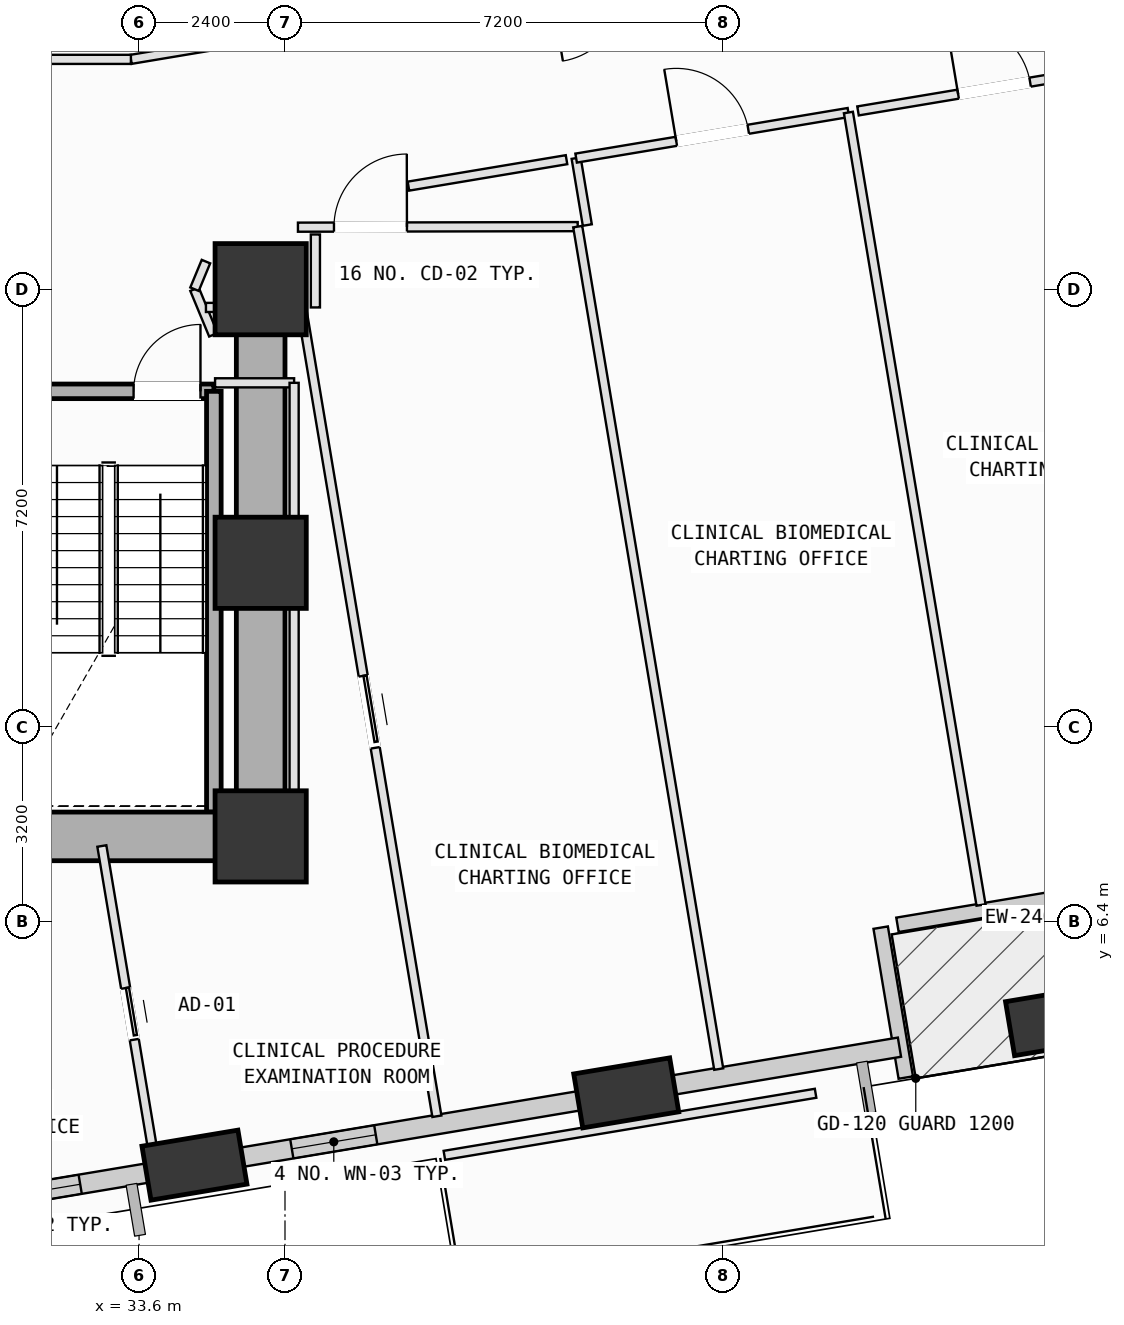
"""IFC4 building model, lengths in metres.
Left out: names, types, materials, properties, quantities, classifications, styles, units other than length and angle.
Written with IfcOpenShell. Run it as: python <this file> out.ifc"""

import sys

from ifc_helpers import new_model, si_unit, direction, frame, frame_2d, origin, origin_2d, place, context, subcontext, project, spatial, rectangle, extrude, element, fill, save


model = new_model("IFC4")
c1 = context("Model", 3, precision=1e-05, world=origin(), true_north=direction((0.0, 1.0)))
c2 = subcontext(c1, "Body", "Model", "MODEL_VIEW")
j1 = project(units=[si_unit("LENGTHUNIT", "METRE"), si_unit("PLANEANGLEUNIT", "RADIAN")], contexts=[c1])
p1 = place(None, origin())
s1 = spatial("IfcSite", under=j1, at=p1, CompositionType="ELEMENT")
p2 = place(p1, origin())
s2 = spatial("IfcBuilding", under=s1, at=p2, CompositionType="ELEMENT")
p3 = place(p2, frame((0.0, 0.0, 63.0)))
s3 = spatial("IfcBuildingStorey", under=s2, at=p3, CompositionType="ELEMENT", Elevation=63.0)
for number, where, z_axis, x_axis in (
    (1, (35.6, 7.8, 0.0), (0.0, 0.0, 1.0), (1.0, 0.0, 0.0)),
    (2, (35.6, 12.3, 0.0), (0.0, 0.0, 1.0), (1.0, 0.0, 0.0)),
    (3, (35.6, 16.8, 0.0), (0.0, 0.0, 1.0), (1.0, 0.0, 0.0)),
):
    element("IfcColumn", number, at=place(p3, frame(where, z_axis=z_axis, x_axis=x_axis)), inside=s3, PredefinedType="COLUMN", context=c2, shape_type="SweptSolid", body=[
        extrude(rectangle(XDim=1.5, YDim=1.5, at=origin_2d()), origin(), (0.0, 0.0, 1.0), 4.0),
    ])
p4 = place(p3, frame((34.511, 2.393, 0.002), z_axis=(0.092393835474, 0.004501082176, 0.995712367818), x_axis=(-0.212136509063, 0.977120773498, 0.015267466098)))
e4 = element("IfcColumn", 4, at=p4, inside=s3, PredefinedType="COLUMN", context=c2, shape_type="SweptSolid", body=[
    extrude(rectangle(XDim=1.6, YDim=0.9, at=origin_2d()), origin(), (0.0, 0.0, 1.0), 4.014),
])
p5 = place(p3, frame((41.612, 3.581, 0.002), z_axis=(0.087275535166, 0.033815468677, 0.995610111961), x_axis=(-0.509554828629, 0.860299502631, 0.015448054711)))
e5 = element("IfcColumn", 5, at=p5, inside=s3, PredefinedType="COLUMN", context=c2, shape_type="SweptSolid", body=[
    extrude(rectangle(XDim=1.6, YDim=0.9, at=origin_2d()), origin(), (0.0, 0.0, 1.0), 4.014),
])
p6 = place(p3, frame((48.713, 4.77, 0.002), z_axis=(0.082085964751, 0.063007509583, 0.994631564011), x_axis=(-0.730759238863, 0.682421599788, 0.01707907958)))
e6 = element("IfcColumn", 6, at=p6, inside=s3, PredefinedType="COLUMN", context=c2, shape_type="SweptSolid", body=[
    extrude(rectangle(XDim=1.6, YDim=0.9, at=origin_2d()), origin(), (0.0, 0.0, 1.0), 4.018),
])
p7 = place(p3, frame((52.938, 7.494, 0.0), z_axis=(0.0, 0.0, 1.0), x_axis=(-0.986280873968, -0.165075854213, 0.0)))
e7 = element("IfcWall", 7, at=p7, inside=s3, PredefinedType="SOLIDWALL", context=c2, shape_type="SweptSolid", body=[
    extrude(rectangle(XDim=6.96, YDim=0.24, at=frame_2d((3.48, 0.0))), origin(), (0.0, 0.0, 1.0), 3.165),
])
p8 = place(p7, frame((2.485, 0.0, 0.0)))
e8 = element("IfcOpeningElement", 8, at=p8, cuts=e7, PredefinedType="OPENING", context=c2, shape_type="SweptSolid", body=[
    extrude(rectangle(XDim=1.1, YDim=2.15, at=frame_2d((0.55, 1.075))), frame((0.0, 0.13, 0.0), z_axis=(0.0, -1.0, 0.0), x_axis=(1.0, 0.0, 0.0)), (0.0, 0.0, 1.0), 0.26),
])
p9 = place(p3, frame((45.797, 6.299, 0.0), z_axis=(0.0, 0.0, 1.0), x_axis=(0.165032373682, -0.986288150409, 0.0)))
e9 = element("IfcWall", 9, at=p9, inside=s3, PredefinedType="SOLIDWALL", context=c2, shape_type="SweptSolid", body=[
    extrude(rectangle(XDim=2.5, YDim=0.24, at=frame_2d((1.25, 0.0))), origin(), (0.0, 0.0, 1.0), 3.165),
])
p10 = place(p3, frame((34.094, 2.323, 0.0), z_axis=(0.0, 0.0, 1.0), x_axis=(-0.986286856303, -0.1650401075, 0.0)))
e10 = element("IfcWall", 10, at=p10, inside=s3, PredefinedType="SOLIDWALL", context=c2, shape_type="SweptSolid", body=[
    extrude(rectangle(XDim=5.99, YDim=0.32, at=frame_2d((2.995, 0.0))), origin(), (0.0, 0.0, 1.0), 3.165),
])
p11 = place(p10, frame((1.482, 0.0, 0.75)))
e11 = element("IfcOpeningElement", 11, at=p11, cuts=e10, PredefinedType="OPENING", context=c2, shape_type="SweptSolid", body=[
    extrude(rectangle(XDim=2.0, YDim=1.95, at=frame_2d((1.0, 0.975))), frame((0.0, 0.17, 0.0), z_axis=(0.0, -1.0, 0.0), x_axis=(1.0, 0.0, 0.0)), (0.0, 0.0, 1.0), 0.34),
])
p12 = place(p3, frame((41.195, 3.512, 0.0), z_axis=(0.0, 0.0, 1.0), x_axis=(-0.986281247381, -0.165073623166, 0.0)))
e12 = element("IfcWall", 12, at=p12, inside=s3, PredefinedType="SOLIDWALL", context=c2, shape_type="SweptSolid", body=[
    extrude(rectangle(XDim=5.985, YDim=0.32, at=frame_2d((2.993, 0.0))), origin(), (0.0, 0.0, 1.0), 3.165),
])
p13 = place(p12, frame((3.754, 0.0, 0.75)))
e13 = element("IfcOpeningElement", 13, at=p13, cuts=e12, PredefinedType="OPENING", context=c2, shape_type="SweptSolid", body=[
    extrude(rectangle(XDim=1.4, YDim=1.85, at=frame_2d((0.7, 0.925))), frame((0.0, 0.17, 0.0), z_axis=(0.0, -1.0, 0.0), x_axis=(1.0, 0.0, 0.0)), (0.0, 0.0, 1.0), 0.34),
])
p14 = place(p3, frame((46.105, 4.333, 0.0), z_axis=(0.0, 0.0, 1.0), x_axis=(-0.986288568415, -0.165029875517, 0.0)))
e14 = element("IfcWall", 14, at=p14, inside=s3, PredefinedType="SOLIDWALL", context=c2, shape_type="SweptSolid", body=[
    extrude(rectangle(XDim=3.765, YDim=0.32, at=frame_2d((1.882, 0.0))), origin(), (0.0, 0.0, 1.0), 3.145),
])
p15 = place(p3, frame((31.37, 15.12, 0.0), z_axis=(0.0, 0.0, 1.0), x_axis=(1.0, 0.0, 0.0)))
e15 = element("IfcWall", 15, at=p15, inside=s3, PredefinedType="SOLIDWALL", context=c2, shape_type="SweptSolid", body=[
    extrude(rectangle(XDim=3.46, YDim=0.24, at=frame_2d((1.73, 0.0))), origin(), (0.0, 0.0, 1.0), 3.78),
])
p16 = place(p15, frame((2.14, 0.0, 0.0)))
e16 = element("IfcOpeningElement", 16, at=p16, cuts=e15, PredefinedType="OPENING", context=c2, shape_type="SweptSolid", body=[
    extrude(rectangle(XDim=1.1, YDim=2.15, at=frame_2d((0.55, 1.075))), frame((0.0, 0.13, 0.0), z_axis=(0.0, -1.0, 0.0), x_axis=(1.0, 0.0, 0.0)), (0.0, 0.0, 1.0), 0.26),
])
p17 = place(p3, frame((34.83, 15.12, 0.0), z_axis=(0.0, 0.0, 1.0), x_axis=(0.0, -1.0, 0.0)))
e17 = element("IfcWall", 17, at=p17, inside=s3, PredefinedType="SOLIDWALL", context=c2, shape_type="SweptSolid", body=[
    extrude(rectangle(XDim=6.92, YDim=0.24, at=frame_2d((3.46, 0.0))), origin(), (0.0, 0.0, 1.0), 3.78),
])
p18 = place(p3, frame((24.8, 7.8, 0.0), z_axis=(0.0, 0.0, 1.0), x_axis=(1.0, 0.0, 0.0)))
e18 = element("IfcWall", 18, at=p18, inside=s3, PredefinedType="SHEAR", context=c2, shape_type="SweptSolid", body=[
    extrude(rectangle(XDim=10.8, YDim=0.8, at=frame_2d((5.4, 0.0))), origin(), (0.0, 0.0, 1.0), 3.78),
])
p19 = place(p3, frame((35.6, 7.8, 0.0), z_axis=(0.0, 0.0, 1.0), x_axis=(0.0, 1.0, 0.0)))
e19 = element("IfcWall", 19, at=p19, inside=s3, PredefinedType="SHEAR", context=c2, shape_type="SweptSolid", body=[
    extrude(rectangle(XDim=9.0, YDim=0.8, at=frame_2d((4.5, 0.0))), origin(), (0.0, 0.0, 1.0), 3.78),
])
p20 = place(p3, frame((32.988, 7.642, 0.0), z_axis=(0.0, 0.0, 1.0), x_axis=(0.165101931281, -0.986276509042, 0.0)))
e20 = element("IfcWall", 20, at=p20, inside=s3, PredefinedType="PARTITIONING", context=c2, shape_type="SweptSolid", body=[
    extrude(rectangle(XDim=5.294, YDim=0.15, at=frame_2d((2.647, 0.0))), origin(), (0.0, 0.0, 1.0), 3.78),
])
p21 = place(p20, frame((2.369, 0.0, 0.0)))
e21 = element("IfcOpeningElement", 21, at=p21, cuts=e20, PredefinedType="OPENING", context=c2, shape_type="SweptSolid", body=[
    extrude(rectangle(XDim=0.86, YDim=2.06, at=frame_2d((0.43, 1.03))), frame((0.0, 0.085, 0.0), z_axis=(0.0, -1.0, 0.0), x_axis=(1.0, 0.0, 0.0)), (0.0, 0.0, 1.0), 0.17),
])
p22 = place(p3, frame((36.15, 15.26, 0.0), z_axis=(0.0, 0.0, 1.0), x_axis=(-1.0, 0.0, 0.0)))
e22 = element("IfcWall", 22, at=p22, inside=s3, PredefinedType="PARTITIONING", context=c2, shape_type="SweptSolid", body=[
    extrude(rectangle(XDim=1.3, YDim=0.15, at=frame_2d((0.65, 0.0))), origin(), (0.0, 0.0, 1.0), 3.78),
])
p23 = place(p3, frame((34.822, 16.05, 0.0), z_axis=(0.0, 0.0, 1.0), x_axis=(-0.382050639738, 0.924141389981, 0.0)))
e23 = element("IfcWall", 23, at=p23, inside=s3, PredefinedType="PARTITIONING", context=c2, shape_type="SweptSolid", body=[
    extrude(rectangle(XDim=0.812, YDim=0.15, at=frame_2d((0.406, 0.0))), origin(), (0.0, 0.0, 1.0), 3.78),
])
p24 = place(p3, frame((34.512, 16.8, 0.0), z_axis=(0.0, 0.0, 1.0), x_axis=(0.382673670509, 0.923883575944, 0.0)))
e24 = element("IfcWall", 24, at=p24, inside=s3, PredefinedType="PARTITIONING", context=c2, shape_type="SweptSolid", body=[
    extrude(rectangle(XDim=0.491, YDim=0.15, at=frame_2d((0.246, 0.0))), origin(), (0.0, 0.0, 1.0), 3.78),
])
p25 = place(p3, frame((34.7, 16.5, 0.0), z_axis=(0.0, 0.0, 1.0), x_axis=(1.0, 0.0, 0.0)))
e25 = element("IfcWall", 25, at=p25, inside=s3, PredefinedType="PARTITIONING", context=c2, shape_type="SweptSolid", body=[
    extrude(rectangle(XDim=1.572, YDim=0.15, at=frame_2d((0.786, 0.0))), origin(), (0.0, 0.0, 1.0), 2.865),
])
p26 = place(p3, frame((36.272, 16.5, 0.0), z_axis=(0.0, 0.0, 1.0), x_axis=(0.165041770244, -0.986286578067, 0.0)))
e26 = element("IfcWall", 26, at=p26, inside=s3, PredefinedType="PARTITIONING", context=c2, shape_type="SweptSolid", body=[
    extrude(rectangle(XDim=13.488, YDim=0.15, at=frame_2d((6.744, 0.0))), origin(), (0.0, 0.0, 1.0), 3.78),
])
p27 = place(p26, frame((6.144, 0.0, 0.0)))
e27 = element("IfcOpeningElement", 27, at=p27, cuts=e26, PredefinedType="OPENING", context=c2, shape_type="SweptSolid", body=[
    extrude(rectangle(XDim=1.2, YDim=2.15, at=frame_2d((0.6, 1.075))), frame((0.0, 0.085, 0.0), z_axis=(0.0, -1.0, 0.0), x_axis=(1.0, 0.0, 0.0)), (0.0, 0.0, 1.0), 0.17),
])
p28 = place(p3, frame((35.33, 2.297, 0.0), z_axis=(0.0, 0.0, 1.0), x_axis=(-0.986323210035, -0.16482270883, 0.0)))
e28 = element("IfcWall", 28, at=p28, inside=s3, PredefinedType="PARTITIONING", context=c2, shape_type="SweptSolid", body=[
    extrude(rectangle(XDim=1.215, YDim=0.15, at=frame_2d((0.607, 0.0))), origin(), (0.0, 0.0, 1.0), 3.165),
])
p29 = place(p3, frame((35.6, 7.5, 0.0), z_axis=(0.0, 0.0, 1.0), x_axis=(1.0, 0.0, 0.0)))
e29 = element("IfcWall", 29, at=p29, inside=s3, PredefinedType="PARTITIONING", context=c2, shape_type="SweptSolid", body=[
    extrude(rectangle(XDim=0.55, YDim=0.15, at=frame_2d((0.275, 0.0))), origin(), (0.0, 0.0, 1.0), 3.78),
])
p30 = place(p3, frame((36.15, 7.5, 0.0), z_axis=(0.0, 0.0, 1.0), x_axis=(0.0, 1.0, 0.0)))
e30 = element("IfcWall", 30, at=p30, inside=s3, PredefinedType="PARTITIONING", context=c2, shape_type="SweptSolid", body=[
    extrude(rectangle(XDim=7.76, YDim=0.15, at=frame_2d((3.88, 0.0))), origin(), (0.0, 0.0, 1.0), 3.78),
])
p31 = place(p3, frame((36.213, 17.82, 0.0), z_axis=(0.0, 0.0, 1.0), x_axis=(0.999998072769, 0.001963277549, 0.0)))
e31 = element("IfcWall", 31, at=p31, inside=s3, PredefinedType="PARTITIONING", context=c2, shape_type="SweptSolid", body=[
    extrude(rectangle(XDim=4.601, YDim=0.15, at=frame_2d((2.301, 0.0))), origin(), (0.0, 0.0, 1.0), 3.78),
])
p32 = place(p31, frame((0.593, 0.0, 0.0)))
e32 = element("IfcOpeningElement", 32, at=p32, cuts=e31, PredefinedType="OPENING", context=c2, shape_type="SweptSolid", body=[
    extrude(rectangle(XDim=1.2, YDim=2.15, at=frame_2d((0.6, 1.075))), frame((0.0, 0.085, 0.0), z_axis=(0.0, -1.0, 0.0), x_axis=(1.0, 0.0, 0.0)), (0.0, 0.0, 1.0), 0.17),
])
p33 = place(p3, frame((40.814, 17.829, 0.0), z_axis=(0.0, 0.0, 1.0), x_axis=(0.165072459157, -0.9862814422, 0.0)))
e33 = element("IfcWall", 33, at=p33, inside=s3, PredefinedType="PARTITIONING", context=c2, shape_type="SweptSolid", body=[
    extrude(rectangle(XDim=14.049, YDim=0.15, at=frame_2d((7.024, 0.0))), origin(), (0.0, 0.0, 1.0), 3.78),
])
p34 = place(p3, frame((36.5, 16.5, 0.0), z_axis=(0.0, 0.0, 1.0), x_axis=(0.0, 1.0, 0.0)))
e34 = element("IfcWall", 34, at=p34, inside=s3, PredefinedType="PARTITIONING", context=c2, shape_type="SweptSolid", body=[
    extrude(rectangle(XDim=1.2, YDim=0.15, at=frame_2d((0.6, 0.0))), origin(), (0.0, 0.0, 1.0), 3.78),
])
p35 = place(p3, frame((40.972, 17.855, 0.0), z_axis=(0.0, 0.0, 1.0), x_axis=(-0.164682702184, 0.986346596081, 0.0)))
e35 = element("IfcWall", 35, at=p35, inside=s3, PredefinedType="PARTITIONING", context=c2, shape_type="SweptSolid", body=[
    extrude(rectangle(XDim=1.116, YDim=0.15, at=frame_2d((0.558, 0.0))), origin(), (0.0, 0.0, 1.0), 3.78),
])
p36 = place(p3, frame((40.788, 18.956, 0.0), z_axis=(0.0, 0.0, 1.0), x_axis=(0.98626281798, 0.165183697352, 0.0)))
e36 = element("IfcWall", 36, at=p36, inside=s3, PredefinedType="PARTITIONING", context=c2, shape_type="SweptSolid", body=[
    extrude(rectangle(XDim=4.54, YDim=0.15, at=frame_2d((2.27, 0.0))), origin(), (0.0, 0.0, 1.0), 3.78),
])
p37 = place(p36, frame((1.67, 0.0, 0.0)))
e37 = element("IfcOpeningElement", 37, at=p37, cuts=e36, PredefinedType="OPENING", context=c2, shape_type="SweptSolid", body=[
    extrude(rectangle(XDim=1.2, YDim=2.15, at=frame_2d((0.6, 1.075))), frame((0.0, 0.085, 0.0), z_axis=(0.0, -1.0, 0.0), x_axis=(1.0, 0.0, 0.0)), (0.0, 0.0, 1.0), 0.17),
])
p38 = place(p3, frame((45.266, 19.706, 0.0), z_axis=(0.0, 0.0, 1.0), x_axis=(0.165031074777, -0.98628836775, 0.0)))
e38 = element("IfcWall", 38, at=p38, inside=s3, PredefinedType="PARTITIONING", context=c2, shape_type="SweptSolid", body=[
    extrude(rectangle(XDim=13.215, YDim=0.15, at=frame_2d((6.607, 0.0))), origin(), (0.0, 0.0, 1.0), 3.78),
])
p39 = place(p3, frame((45.424, 19.732, 0.0), z_axis=(0.0, 0.0, 1.0), x_axis=(0.986290516722, 0.165018231188, 0.0)))
e39 = element("IfcWall", 39, at=p39, inside=s3, PredefinedType="PARTITIONING", context=c2, shape_type="SweptSolid", body=[
    extrude(rectangle(XDim=4.539, YDim=0.15, at=frame_2d((2.27, 0.0))), origin(), (0.0, 0.0, 1.0), 3.78),
])
p40 = place(p39, frame((1.67, 0.0, 0.0)))
e40 = element("IfcOpeningElement", 40, at=p40, cuts=e39, PredefinedType="OPENING", context=c2, shape_type="SweptSolid", body=[
    extrude(rectangle(XDim=1.2, YDim=2.15, at=frame_2d((0.6, 1.075))), frame((0.0, 0.085, 0.0), z_axis=(0.0, -1.0, 0.0), x_axis=(1.0, 0.0, 0.0)), (0.0, 0.0, 1.0), 0.17),
])
p41 = place(p3, frame((36.82, 21.141, 0.0), z_axis=(0.0, 0.0, 1.0), x_axis=(-0.98629673406, -0.16498106674, 0.0)))
e41 = element("IfcWall", 41, at=p41, inside=s3, PredefinedType="PARTITIONING", context=c2, shape_type="SweptSolid", body=[
    extrude(rectangle(XDim=3.401, YDim=0.15, at=frame_2d((1.7, 0.0))), origin(), (0.0, 0.0, 1.0), 3.78),
])
p42 = place(p3, frame((33.466, 20.58, 0.0), z_axis=(0.0, 0.0, 1.0), x_axis=(-1.0, 0.0, 0.0)))
e42 = element("IfcWall", 42, at=p42, inside=s3, PredefinedType="PARTITIONING", context=c2, shape_type="SweptSolid", body=[
    extrude(rectangle(XDim=4.83, YDim=0.15, at=frame_2d((2.415, 0.0))), origin(), (0.0, 0.0, 1.0), 3.78),
])
p43 = place(p42, frame((1.815, 0.0, 0.0)))
e43 = element("IfcOpeningElement", 43, at=p43, cuts=e42, PredefinedType="OPENING", context=c2, shape_type="SweptSolid", body=[
    extrude(rectangle(XDim=1.2, YDim=2.15, at=frame_2d((0.6, 1.075))), frame((0.0, 0.085, 0.0), z_axis=(0.0, -1.0, 0.0), x_axis=(1.0, 0.0, 0.0)), (0.0, 0.0, 1.0), 0.17),
])
p44 = place(p3, frame((40.63, 18.93, 0.0), z_axis=(0.0, 0.0, 1.0), x_axis=(-0.98630114816, -0.164954676014, 0.0)))
e44 = element("IfcWall", 44, at=p44, inside=s3, PredefinedType="PARTITIONING", context=c2, shape_type="SweptSolid", body=[
    extrude(rectangle(XDim=2.636, YDim=0.15, at=frame_2d((1.318, 0.0))), origin(), (0.0, 0.0, 1.0), 3.78),
])
p45 = place(p3, frame((44.726, 3.575, 0.0), z_axis=(0.0, 0.0, 1.0), x_axis=(-0.986302093025, -0.164949026355, 0.0)))
e45 = element("IfcWall", 45, at=p45, inside=s3, PredefinedType="PARTITIONING", context=c2, shape_type="SweptSolid", body=[
    extrude(rectangle(XDim=6.19, YDim=0.15, at=frame_2d((3.095, 0.0))), origin(), (0.0, 0.0, 1.0), 3.78),
])
p46 = place(p11, origin())
e46 = element("IfcWindow", 46, at=p46, inside=s3, PartitioningType="SINGLE_PANEL", PredefinedType="WINDOW", context=c2, shape_type="SweptSolid", body=[
    extrude(rectangle(XDim=2.0, YDim=1.95, at=frame_2d((1.0, 0.975))), frame((0.0, 0.03, 0.0), z_axis=(0.0, -1.0, 0.0), x_axis=(1.0, 0.0, 0.0)), (0.0, 0.0, 1.0), 0.06),
])
fill(e11, e46)
p47 = place(p13, origin())
e47 = element("IfcWindow", 47, at=p47, inside=s3, PartitioningType="SINGLE_PANEL", PredefinedType="WINDOW", context=c2, shape_type="SweptSolid", body=[
    extrude(rectangle(XDim=1.4, YDim=1.85, at=frame_2d((0.7, 0.925))), frame((0.0, 0.03, 0.0), z_axis=(0.0, -1.0, 0.0), x_axis=(1.0, 0.0, 0.0)), (0.0, 0.0, 1.0), 0.06),
])
fill(e13, e47)
p48 = place(p16, origin())
e48 = element("IfcDoor", 48, at=p48, inside=s3, OperationType="SINGLE_SWING_RIGHT", PredefinedType="DOOR", context=c2, shape_type="SweptSolid", body=[
    extrude(rectangle(XDim=1.1, YDim=2.15, at=frame_2d((0.55, 1.075))), frame((0.0, 0.025, 0.0), z_axis=(0.0, -1.0, 0.0), x_axis=(1.0, 0.0, 0.0)), (0.0, 0.0, 1.0), 0.05),
])
fill(e16, e48)
p49 = place(p32, origin())
e49 = element("IfcDoor", 49, at=p49, inside=s3, OperationType="SINGLE_SWING_RIGHT", PredefinedType="DOOR", context=c2, shape_type="SweptSolid", body=[
    extrude(rectangle(XDim=1.2, YDim=2.15, at=frame_2d((0.6, 1.075))), frame((0.0, 0.025, 0.0), z_axis=(0.0, -1.0, 0.0), x_axis=(1.0, 0.0, 0.0)), (0.0, 0.0, 1.0), 0.05),
])
fill(e32, e49)
p50 = place(p37, origin())
e50 = element("IfcDoor", 50, at=p50, inside=s3, OperationType="SINGLE_SWING_LEFT", PredefinedType="DOOR", context=c2, shape_type="SweptSolid", body=[
    extrude(rectangle(XDim=1.2, YDim=2.15, at=frame_2d((0.6, 1.075))), frame((0.0, 0.025, 0.0), z_axis=(0.0, -1.0, 0.0), x_axis=(1.0, 0.0, 0.0)), (0.0, 0.0, 1.0), 0.05),
])
fill(e37, e50)
p51 = place(p40, origin())
e51 = element("IfcDoor", 51, at=p51, inside=s3, OperationType="SINGLE_SWING_LEFT", PredefinedType="DOOR", context=c2, shape_type="SweptSolid", body=[
    extrude(rectangle(XDim=1.2, YDim=2.15, at=frame_2d((0.6, 1.075))), frame((0.0, 0.025, 0.0), z_axis=(0.0, -1.0, 0.0), x_axis=(1.0, 0.0, 0.0)), (0.0, 0.0, 1.0), 0.05),
])
fill(e40, e51)
p52 = place(p27, origin())
e52 = element("IfcDoor", 52, at=p52, inside=s3, OperationType="SLIDING_TO_LEFT", PredefinedType="DOOR", context=c2, shape_type="SweptSolid", body=[
    extrude(rectangle(XDim=1.2, YDim=2.15, at=frame_2d((0.6, 1.075))), frame((0.0, 0.025, 0.0), z_axis=(0.0, -1.0, 0.0), x_axis=(1.0, 0.0, 0.0)), (0.0, 0.0, 1.0), 0.05),
])
fill(e27, e52)
p53 = place(p21, origin())
e53 = element("IfcDoor", 53, at=p53, inside=s3, OperationType="SLIDING_TO_LEFT", PredefinedType="DOOR", context=c2, shape_type="SweptSolid", body=[
    extrude(rectangle(XDim=0.86, YDim=2.06, at=frame_2d((0.43, 1.03))), frame((0.0, 0.025, 0.0), z_axis=(0.0, -1.0, 0.0), x_axis=(1.0, 0.0, 0.0)), (0.0, 0.0, 1.0), 0.05),
])
fill(e21, e53)
save(model, sys.argv[1])
